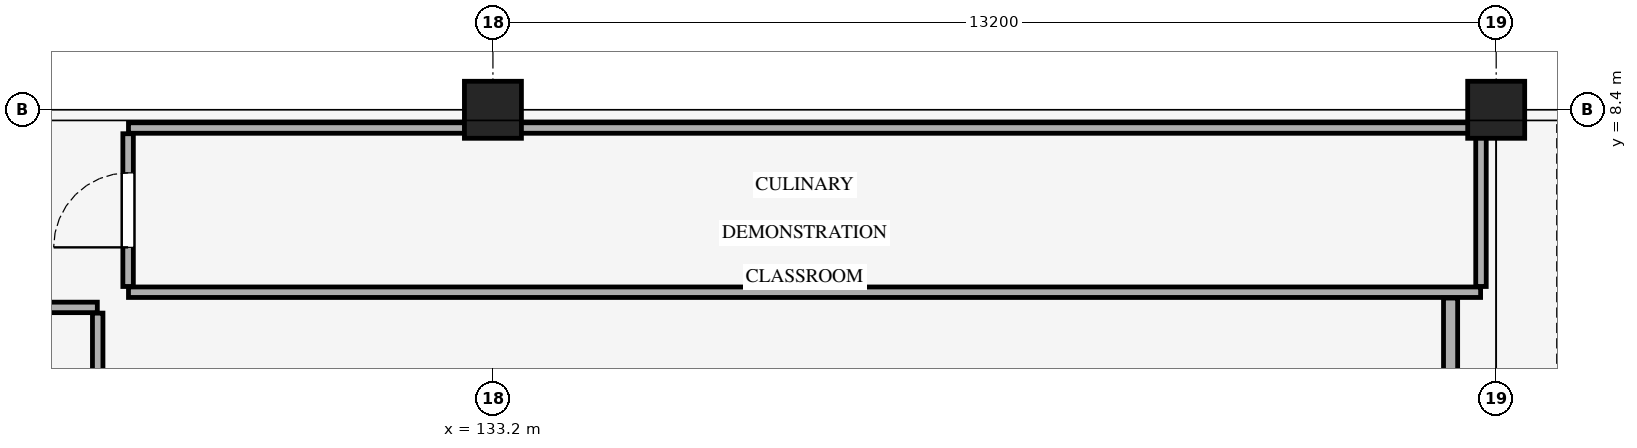
"""IFC4 building model, lengths in metres.
Left out: names, types, materials, properties, quantities, classifications, styles, units other than length and angle.
Written with IfcOpenShell. Run it as: python <this file> out.ifc"""

import sys

from ifc_helpers import new_model, si_unit, direction, frame, frame_2d, origin, origin_2d, place, context, subcontext, project, spatial, rectangle, extrude, element, fill, save


model = new_model("IFC4")
c1 = context("Model", 3, precision=1e-05, world=origin(), true_north=direction((0.0, 1.0)))
c2 = subcontext(c1, "Body", "Model", "MODEL_VIEW")
j1 = project(units=[si_unit("LENGTHUNIT", "METRE"), si_unit("PLANEANGLEUNIT", "RADIAN")], contexts=[c1])
p1 = place(None, origin())
s1 = spatial("IfcSite", under=j1, at=p1, CompositionType="ELEMENT")
p2 = place(p1, origin())
s2 = spatial("IfcBuilding", under=s1, at=p2, CompositionType="ELEMENT")
p3 = place(p2, frame((0.0, 0.0, 4.8)))
s3 = spatial("IfcBuildingStorey", under=s2, at=p3, CompositionType="ELEMENT", Elevation=4.8)
for number, where, z_axis, x_axis in (
    (1, (133.2, 8.4, 0.0), (0.0, 0.0, 1.0), (1.0, 0.0, 0.0)),
    (2, (146.4, 8.4, 0.0), (0.0, 0.0, 1.0), (1.0, 0.0, 0.0)),
):
    element("IfcColumn", number, at=place(p3, frame(where, z_axis=z_axis, x_axis=x_axis)), inside=s3, PredefinedType="COLUMN", context=c2, shape_type="SweptSolid", body=[
        extrude(rectangle(XDim=0.75, YDim=0.75, at=origin_2d()), origin(), (0.0, 0.0, 1.0), 4.8),
    ])
p4 = place(p3, frame((128.4, 6.075, 0.0), z_axis=(0.0, 0.0, 1.0), x_axis=(0.0, 1.0, 0.0)))
e3 = element("IfcWall", 3, at=p4, inside=s3, PredefinedType="STANDARD", context=c2, shape_type="SweptSolid", body=[
    extrude(rectangle(XDim=2.01, YDim=0.138, at=frame_2d((1.005, 0.0))), origin(), (0.0, 0.0, 1.0), 4.54),
])
p5 = place(p4, frame((0.515, 0.0, 0.0)))
e4 = element("IfcOpeningElement", 4, at=p5, cuts=e3, PredefinedType="OPENING", context=c2, shape_type="SweptSolid", body=[
    extrude(rectangle(XDim=0.98, YDim=2.14, at=frame_2d((0.49, 1.07))), frame((0.0, 0.079, 0.0), z_axis=(0.0, -1.0, 0.0), x_axis=(1.0, 0.0, 0.0)), (0.0, 0.0, 1.0), 0.158),
])
p6 = place(p3, frame((128.405, 8.16, 0.0), z_axis=(0.0, 0.0, 1.0), x_axis=(1.0, 0.0, 0.0)))
e5 = element("IfcWall", 5, at=p6, inside=s3, PredefinedType="STANDARD", context=c2, shape_type="SweptSolid", body=[
    extrude(rectangle(XDim=17.79, YDim=0.138, at=frame_2d((8.895, 0.0))), origin(), (0.0, 0.0, 1.0), 3.255),
])
p7 = place(p3, frame((146.2, 8.085, 0.0), z_axis=(0.0, 0.0, 1.0), x_axis=(0.0, -1.0, 0.0)))
e6 = element("IfcWall", 6, at=p7, inside=s3, PredefinedType="STANDARD", context=c2, shape_type="SweptSolid", body=[
    extrude(rectangle(XDim=2.01, YDim=0.138, at=frame_2d((1.005, 0.0))), origin(), (0.0, 0.0, 1.0), 3.255),
])
p8 = place(p3, frame((146.195, 6.0, 0.0), z_axis=(0.0, 0.0, 1.0), x_axis=(-1.0, 0.0, 0.0)))
e7 = element("IfcWall", 7, at=p8, inside=s3, PredefinedType="STANDARD", context=c2, shape_type="SweptSolid", body=[
    extrude(rectangle(XDim=17.79, YDim=0.138, at=frame_2d((8.895, 0.0))), origin(), (0.0, 0.0, 1.0), 4.54),
])
p9 = place(p3, frame((128.0, 5.725, 0.0), z_axis=(0.0, 0.0, 1.0), x_axis=(0.0, -1.0, 0.0)))
e8 = element("IfcWall", 8, at=p9, inside=s3, PredefinedType="STANDARD", context=c2, shape_type="SweptSolid", body=[
    extrude(rectangle(XDim=5.25, YDim=0.138, at=frame_2d((2.625, 0.0))), origin(), (0.0, 0.0, 1.0), 4.54),
])
p10 = place(p3, frame((106.005, 5.8, 0.0), z_axis=(0.0, 0.0, 1.0), x_axis=(1.0, 0.0, 0.0)))
e9 = element("IfcWall", 9, at=p10, inside=s3, PredefinedType="STANDARD", context=c2, shape_type="SweptSolid", body=[
    extrude(rectangle(XDim=21.99, YDim=0.138, at=frame_2d((10.995, 0.0))), origin(), (0.0, 0.0, 1.0), 4.54),
])
p11 = place(p10, frame((10.505, 0.0, 0.0)))
e10 = element("IfcOpeningElement", 10, at=p11, cuts=e9, PredefinedType="OPENING", context=c2, shape_type="SweptSolid", body=[
    extrude(rectangle(XDim=0.98, YDim=2.14, at=frame_2d((0.49, 1.07))), frame((0.0, 0.079, 0.0), z_axis=(0.0, -1.0, 0.0), x_axis=(1.0, 0.0, 0.0)), (0.0, 0.0, 1.0), 0.158),
])
p12 = place(p3, frame((145.8, 5.923, 0.0), z_axis=(0.0, 0.0, 1.0), x_axis=(0.0, -1.0, 0.0)))
e11 = element("IfcWall", 11, at=p12, inside=s3, PredefinedType="STANDARD", context=c2, shape_type="SweptSolid", body=[
    extrude(rectangle(XDim=5.448, YDim=0.186, at=frame_2d((2.724, 0.0))), origin(), (0.0, 0.0, 1.0), 4.54),
])
p13 = place(p12, frame((1.999, 0.0, 0.0)))
e12 = element("IfcOpeningElement", 12, at=p13, cuts=e11, PredefinedType="OPENING", context=c2, shape_type="SweptSolid", body=[
    extrude(rectangle(XDim=1.45, YDim=2.22, at=frame_2d((0.725, 1.11))), frame((0.0, 0.103, 0.0), z_axis=(0.0, -1.0, 0.0), x_axis=(1.0, 0.0, 0.0)), (0.0, 0.0, 1.0), 0.206),
])
p14 = place(p5, origin())
e13 = element("IfcDoor", 13, at=p14, inside=s3, OperationType="SINGLE_SWING_LEFT", PredefinedType="DOOR", context=c2, shape_type="SweptSolid", body=[
    extrude(rectangle(XDim=0.98, YDim=2.14, at=frame_2d((0.49, 1.07))), frame((0.0, 0.025, 0.0), z_axis=(0.0, -1.0, 0.0), x_axis=(1.0, 0.0, 0.0)), (0.0, 0.0, 1.0), 0.05),
])
fill(e4, e13)
save(model, sys.argv[1])
